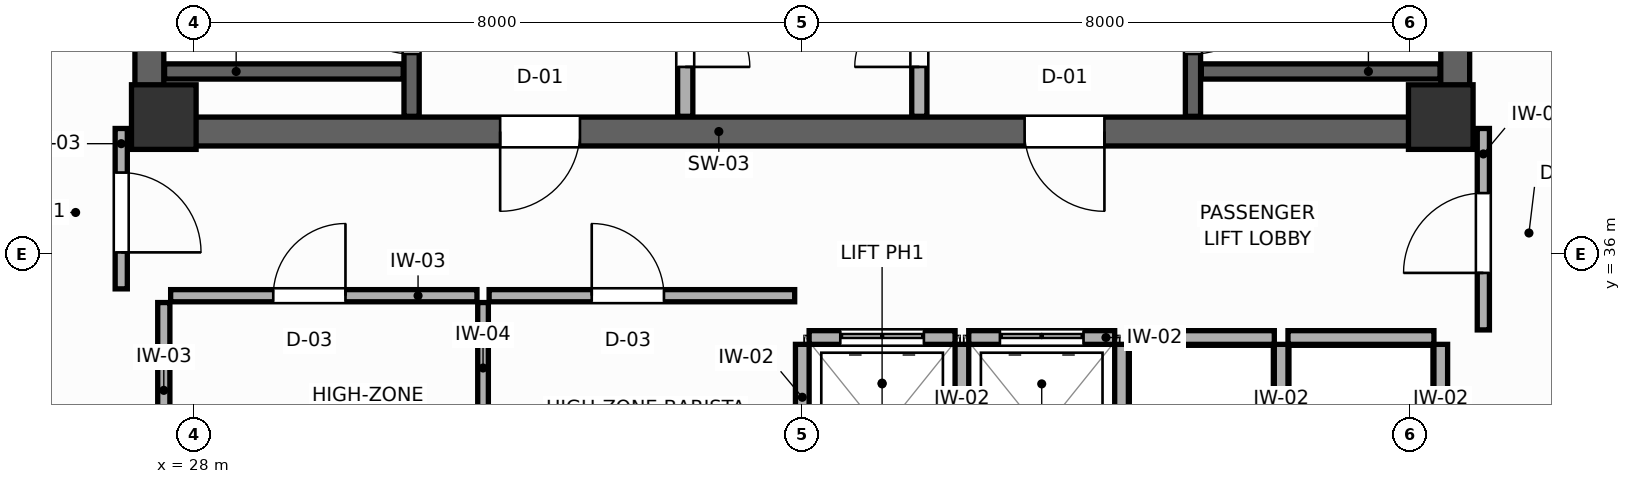
"""IFC4 building model, lengths in metres.
Left out: names, types, materials, properties, quantities, classifications, styles, units other than length and angle.
Written with IfcOpenShell. Run it as: python <this file> out.ifc"""

import sys

from ifc_helpers import new_model, si_unit, direction, frame, frame_2d, origin, origin_2d, place, context, subcontext, project, spatial, rectangle, extrude, source, transform, mapped, element, fill, save


model = new_model("IFC4")
c1 = context("Model", 3, precision=1e-05, world=origin(), true_north=direction((0.0, 1.0)))
c2 = subcontext(c1, "Body", "Model", "MODEL_VIEW")
j1 = project(units=[si_unit("LENGTHUNIT", "METRE"), si_unit("PLANEANGLEUNIT", "RADIAN")], contexts=[c1])
p1 = place(None, origin())
s1 = spatial("IfcSite", under=j1, at=p1, CompositionType="ELEMENT")
p2 = place(p1, origin())
s2 = spatial("IfcBuilding", under=s1, at=p2, CompositionType="ELEMENT")
p3 = place(p2, frame((0.0, 0.0, 250.2)))
s3 = spatial("IfcBuildingStorey", under=s2, at=p3, CompositionType="ELEMENT", Elevation=250.2)
p4 = place(p3, frame((27.22, 37.61, 0.0), z_axis=(0.0, 0.0, 1.0), x_axis=(1.0, 0.0, 0.0)))
e1 = element("IfcWall", 1, at=p4, inside=s3, PredefinedType="SHEAR", context=c2, shape_type="SweptSolid", body=[
    extrude(rectangle(XDim=17.56, YDim=0.38, at=frame_2d((8.78, 0.0))), origin(), (0.0, 0.0, 1.0), 3.6),
])
p5 = place(p4, frame((4.805, 0.0, 0.0)))
e2 = element("IfcOpeningElement", 2, at=p5, cuts=e1, PredefinedType="OPENING", context=c2, shape_type="SweptSolid", body=[
    extrude(rectangle(XDim=1.05, YDim=2.1, at=frame_2d((0.525, 1.05))), frame((0.0, 0.2, 0.0), z_axis=(0.0, -1.0, 0.0), x_axis=(1.0, 0.0, 0.0)), (0.0, 0.0, 1.0), 0.4),
])
p6 = place(p4, frame((11.705, 0.0, 0.0)))
e3 = element("IfcOpeningElement", 3, at=p6, cuts=e1, PredefinedType="OPENING", context=c2, shape_type="SweptSolid", body=[
    extrude(rectangle(XDim=1.05, YDim=2.1, at=frame_2d((0.525, 1.05))), frame((0.0, 0.2, 0.0), z_axis=(0.0, -1.0, 0.0), x_axis=(1.0, 0.0, 0.0)), (0.0, 0.0, 1.0), 0.4),
])
for number, where, z_axis, x_axis in (
    (4, (27.41, 37.8, 0.0), (0.0, 0.0, 1.0), (0.0, 1.0, 0.0)),
    (5, (44.59, 37.8, 0.0), (0.0, 0.0, 1.0), (0.0, 1.0, 0.0)),
):
    element("IfcWall", number, at=place(p3, frame(where, z_axis=z_axis, x_axis=x_axis)), inside=s3, PredefinedType="SHEAR", context=c2, shape_type="SweptSolid", body=[
        extrude(rectangle(XDim=9.0, YDim=0.38, at=frame_2d((4.5, 0.0))), origin(), (0.0, 0.0, 1.0), 3.6),
    ])
m1 = source(origin(), c2, "Body", "SweptSolid", [
    extrude(rectangle(XDim=0.85, YDim=0.85, at=origin_2d()), origin(), (0.0, 0.0, 1.0), 3.6),
])
for number, where, z_axis, x_axis in (
    (6, (27.6, 37.8, 0.0), (0.0, 0.0, 1.0), (1.0, 0.0, 0.0)),
    (7, (44.4, 37.8, 0.0), (0.0, 0.0, 1.0), (1.0, 0.0, 0.0)),
):
    element("IfcColumn", number, at=place(p3, frame(where, z_axis=z_axis, x_axis=x_axis)), inside=s3, PredefinedType="COLUMN", context=c2, shape_type="MappedRepresentation", body=[
        mapped(m1, transform((0.0, 0.0, 0.0), scale=1.0)),
    ])
p7 = place(p3, frame((30.86, 37.81, 0.0), z_axis=(0.0, 0.0, 1.0), x_axis=(0.0, 1.0, 0.0)))
e8 = element("IfcWall", 8, at=p7, inside=s3, PredefinedType="SHEAR", context=c2, shape_type="SweptSolid", body=[
    extrude(rectangle(XDim=8.98, YDim=0.2, at=frame_2d((4.49, 0.0))), origin(), (0.0, 0.0, 1.0), 3.6),
])
p8 = place(p7, frame((0.82, 0.0, 0.0)))
e9 = element("IfcOpeningElement", 9, at=p8, cuts=e8, PredefinedType="OPENING", context=c2, shape_type="SweptSolid", body=[
    extrude(rectangle(XDim=1.05, YDim=2.1, at=frame_2d((0.525, 1.05))), frame((0.0, 0.11, 0.0), z_axis=(0.0, -1.0, 0.0), x_axis=(1.0, 0.0, 0.0)), (0.0, 0.0, 1.0), 0.22),
])
p9 = place(p3, frame((27.61, 38.4, 0.0), z_axis=(0.0, 0.0, 1.0), x_axis=(1.0, 0.0, 0.0)))
e10 = element("IfcWall", 10, at=p9, inside=s3, PredefinedType="SHEAR", context=c2, shape_type="SweptSolid", body=[
    extrude(rectangle(XDim=3.14, YDim=0.2, at=frame_2d((1.57, 0.0))), origin(), (0.0, 0.0, 1.0), 3.6),
])
p10 = place(p3, frame((41.14, 37.81, 0.0), z_axis=(0.0, 0.0, 1.0), x_axis=(0.0, 1.0, 0.0)))
e11 = element("IfcWall", 11, at=p10, inside=s3, PredefinedType="SHEAR", context=c2, shape_type="SweptSolid", body=[
    extrude(rectangle(XDim=8.98, YDim=0.2, at=frame_2d((4.49, 0.0))), origin(), (0.0, 0.0, 1.0), 3.6),
])
p11 = place(p10, frame((0.82, 0.0, 0.0)))
e12 = element("IfcOpeningElement", 12, at=p11, cuts=e11, PredefinedType="OPENING", context=c2, shape_type="SweptSolid", body=[
    extrude(rectangle(XDim=1.05, YDim=2.1, at=frame_2d((0.525, 1.05))), frame((0.0, 0.11, 0.0), z_axis=(0.0, -1.0, 0.0), x_axis=(1.0, 0.0, 0.0)), (0.0, 0.0, 1.0), 0.22),
])
p12 = place(p3, frame((41.25, 38.4, 0.0), z_axis=(0.0, 0.0, 1.0), x_axis=(1.0, 0.0, 0.0)))
e13 = element("IfcWall", 13, at=p12, inside=s3, PredefinedType="SHEAR", context=c2, shape_type="SweptSolid", body=[
    extrude(rectangle(XDim=3.14, YDim=0.2, at=frame_2d((1.57, 0.0))), origin(), (0.0, 0.0, 1.0), 3.6),
])
p13 = place(p3, frame((34.46, 37.81, 0.0), z_axis=(0.0, 0.0, 1.0), x_axis=(0.0, 1.0, 0.0)))
e14 = element("IfcWall", 14, at=p13, inside=s3, PredefinedType="PARTITIONING", context=c2, shape_type="SweptSolid", body=[
    extrude(rectangle(XDim=8.98, YDim=0.2, at=frame_2d((4.49, 0.0))), origin(), (0.0, 0.0, 1.0), 3.41),
])
p14 = place(p13, frame((0.65, 0.0, 0.0)))
e15 = element("IfcOpeningElement", 15, at=p14, cuts=e14, PredefinedType="OPENING", context=c2, shape_type="SweptSolid", body=[
    extrude(rectangle(XDim=0.85, YDim=2.05, at=frame_2d((0.425, 1.025))), frame((0.0, 0.11, 0.0), z_axis=(0.0, -1.0, 0.0), x_axis=(1.0, 0.0, 0.0)), (0.0, 0.0, 1.0), 0.22),
])
p15 = place(p3, frame((37.54, 37.81, 0.0), z_axis=(0.0, 0.0, 1.0), x_axis=(0.0, 1.0, 0.0)))
e16 = element("IfcWall", 16, at=p15, inside=s3, PredefinedType="PARTITIONING", context=c2, shape_type="SweptSolid", body=[
    extrude(rectangle(XDim=8.98, YDim=0.2, at=frame_2d((4.49, 0.0))), origin(), (0.0, 0.0, 1.0), 3.41),
])
p16 = place(p15, frame((0.65, 0.0, 0.0)))
e17 = element("IfcOpeningElement", 17, at=p16, cuts=e16, PredefinedType="OPENING", context=c2, shape_type="SweptSolid", body=[
    extrude(rectangle(XDim=0.85, YDim=2.05, at=frame_2d((0.425, 1.025))), frame((0.0, 0.11, 0.0), z_axis=(0.0, -1.0, 0.0), x_axis=(1.0, 0.0, 0.0)), (0.0, 0.0, 1.0), 0.22),
])
p17 = place(p3, frame((36.09, 34.9, 0.0), z_axis=(0.0, 0.0, 1.0), x_axis=(1.0, 0.0, 0.0)))
e18 = element("IfcWall", 18, at=p17, inside=s3, PredefinedType="PARTITIONING", context=c2, shape_type="SweptSolid", body=[
    extrude(rectangle(XDim=1.92, YDim=0.18, at=frame_2d((0.96, 0.0))), origin(), (0.0, 0.0, 1.0), 3.41),
])
p18 = place(p17, frame((0.41, 0.0, 0.0)))
e19 = element("IfcOpeningElement", 19, at=p18, cuts=e18, PredefinedType="OPENING", context=c2, shape_type="SweptSolid", body=[
    extrude(rectangle(XDim=1.1, YDim=2.1, at=frame_2d((0.55, 1.05))), frame((0.0, 0.1, 0.0), z_axis=(0.0, -1.0, 0.0), x_axis=(1.0, 0.0, 0.0)), (0.0, 0.0, 1.0), 0.2),
])
p19 = place(p3, frame((36.0, 32.49, 0.0), z_axis=(0.0, 0.0, 1.0), x_axis=(0.0, 1.0, 0.0)))
e20 = element("IfcWall", 20, at=p19, inside=s3, PredefinedType="PARTITIONING", context=c2, shape_type="SweptSolid", body=[
    extrude(rectangle(XDim=2.32, YDim=0.18, at=frame_2d((1.16, 0.0))), origin(), (0.0, 0.0, 1.0), 3.41),
])
p20 = place(p3, frame((38.19, 34.9, 0.0), z_axis=(0.0, 0.0, 1.0), x_axis=(1.0, 0.0, 0.0)))
e21 = element("IfcWall", 21, at=p20, inside=s3, PredefinedType="PARTITIONING", context=c2, shape_type="SweptSolid", body=[
    extrude(rectangle(XDim=1.92, YDim=0.18, at=frame_2d((0.96, 0.0))), origin(), (0.0, 0.0, 1.0), 3.41),
])
p21 = place(p20, frame((0.41, 0.0, 0.0)))
e22 = element("IfcOpeningElement", 22, at=p21, cuts=e21, PredefinedType="OPENING", context=c2, shape_type="SweptSolid", body=[
    extrude(rectangle(XDim=1.1, YDim=2.1, at=frame_2d((0.55, 1.05))), frame((0.0, 0.1, 0.0), z_axis=(0.0, -1.0, 0.0), x_axis=(1.0, 0.0, 0.0)), (0.0, 0.0, 1.0), 0.2),
])
p22 = place(p3, frame((38.1, 32.49, 0.0), z_axis=(0.0, 0.0, 1.0), x_axis=(0.0, 1.0, 0.0)))
e23 = element("IfcWall", 23, at=p22, inside=s3, PredefinedType="PARTITIONING", context=c2, shape_type="SweptSolid", body=[
    extrude(rectangle(XDim=2.32, YDim=0.18, at=frame_2d((1.16, 0.0))), origin(), (0.0, 0.0, 1.0), 3.41),
])
p23 = place(p3, frame((40.29, 34.9, 0.0), z_axis=(0.0, 0.0, 1.0), x_axis=(1.0, 0.0, 0.0)))
e24 = element("IfcWall", 24, at=p23, inside=s3, PredefinedType="PARTITIONING", context=c2, shape_type="SweptSolid", body=[
    extrude(rectangle(XDim=1.92, YDim=0.18, at=frame_2d((0.96, 0.0))), origin(), (0.0, 0.0, 1.0), 3.41),
])
p24 = place(p3, frame((40.2, 32.49, 0.0), z_axis=(0.0, 0.0, 1.0), x_axis=(0.0, 1.0, 0.0)))
e25 = element("IfcWall", 25, at=p24, inside=s3, PredefinedType="PARTITIONING", context=c2, shape_type="SweptSolid", body=[
    extrude(rectangle(XDim=2.32, YDim=0.18, at=frame_2d((1.16, 0.0))), origin(), (0.0, 0.0, 1.0), 3.41),
])
p25 = place(p3, frame((42.39, 34.9, 0.0), z_axis=(0.0, 0.0, 1.0), x_axis=(1.0, 0.0, 0.0)))
e26 = element("IfcWall", 26, at=p25, inside=s3, PredefinedType="PARTITIONING", context=c2, shape_type="SweptSolid", body=[
    extrude(rectangle(XDim=1.92, YDim=0.18, at=frame_2d((0.96, 0.0))), origin(), (0.0, 0.0, 1.0), 3.41),
])
for number, where, z_axis, x_axis in (
    (27, (42.3, 32.49, 0.0), (0.0, 0.0, 1.0), (0.0, 1.0, 0.0)),
    (28, (44.4, 32.49, 0.0), (0.0, 0.0, 1.0), (0.0, 1.0, 0.0)),
):
    element("IfcWall", number, at=place(p3, frame(where, z_axis=z_axis, x_axis=x_axis)), inside=s3, PredefinedType="PARTITIONING", context=c2, shape_type="SweptSolid", body=[
        extrude(rectangle(XDim=2.32, YDim=0.18, at=frame_2d((1.16, 0.0))), origin(), (0.0, 0.0, 1.0), 3.41),
    ])
p26 = place(p3, frame((27.6, 33.05, 0.0), z_axis=(0.0, 0.0, 1.0), x_axis=(0.0, 1.0, 0.0)))
e29 = element("IfcWall", 29, at=p26, inside=s3, PredefinedType="PARTITIONING", context=c2, shape_type="SweptSolid", body=[
    extrude(rectangle(XDim=2.31, YDim=0.16, at=frame_2d((1.155, 0.0))), origin(), (0.0, 0.0, 1.0), 3.41),
])
p27 = place(p3, frame((31.8, 32.49, 0.0), z_axis=(0.0, 0.0, 1.0), x_axis=(0.0, 1.0, 0.0)))
e30 = element("IfcWall", 30, at=p27, inside=s3, PredefinedType="PARTITIONING", context=c2, shape_type="SweptSolid", body=[
    extrude(rectangle(XDim=2.87, YDim=0.14, at=frame_2d((1.435, 0.0))), origin(), (0.0, 0.0, 1.0), 3.41),
])
p28 = place(p3, frame((27.69, 35.45, 0.0), z_axis=(0.0, 0.0, 1.0), x_axis=(1.0, 0.0, 0.0)))
e31 = element("IfcWall", 31, at=p28, inside=s3, PredefinedType="PARTITIONING", context=c2, shape_type="SweptSolid", body=[
    extrude(rectangle(XDim=4.03, YDim=0.16, at=frame_2d((2.015, 0.0))), origin(), (0.0, 0.0, 1.0), 3.41),
])
p29 = place(p28, frame((1.35, 0.0, 0.0)))
e32 = element("IfcOpeningElement", 32, at=p29, cuts=e31, PredefinedType="OPENING", context=c2, shape_type="SweptSolid", body=[
    extrude(rectangle(XDim=0.95, YDim=2.05, at=frame_2d((0.475, 1.025))), frame((0.0, 0.09, 0.0), z_axis=(0.0, -1.0, 0.0), x_axis=(1.0, 0.0, 0.0)), (0.0, 0.0, 1.0), 0.18),
])
p30 = place(p3, frame((31.88, 35.45, 0.0), z_axis=(0.0, 0.0, 1.0), x_axis=(1.0, 0.0, 0.0)))
e33 = element("IfcWall", 33, at=p30, inside=s3, PredefinedType="PARTITIONING", context=c2, shape_type="SweptSolid", body=[
    extrude(rectangle(XDim=4.02, YDim=0.16, at=frame_2d((2.01, 0.0))), origin(), (0.0, 0.0, 1.0), 3.41),
])
p31 = place(p30, frame((1.35, 0.0, 0.0)))
e34 = element("IfcOpeningElement", 34, at=p31, cuts=e33, PredefinedType="OPENING", context=c2, shape_type="SweptSolid", body=[
    extrude(rectangle(XDim=0.95, YDim=2.05, at=frame_2d((0.475, 1.025))), frame((0.0, 0.09, 0.0), z_axis=(0.0, -1.0, 0.0), x_axis=(1.0, 0.0, 0.0)), (0.0, 0.0, 1.0), 0.18),
])
p32 = place(p3, frame((27.04, 35.54, 0.0), z_axis=(0.0, 0.0, 1.0), x_axis=(0.0, 1.0, 0.0)))
e35 = element("IfcWall", 35, at=p32, inside=s3, PredefinedType="PARTITIONING", context=c2, shape_type="SweptSolid", body=[
    extrude(rectangle(XDim=2.11, YDim=0.16, at=frame_2d((1.055, 0.0))), origin(), (0.0, 0.0, 1.0), 3.41),
])
p33 = place(p32, frame((0.48, 0.0, 0.0)))
e36 = element("IfcOpeningElement", 36, at=p33, cuts=e35, PredefinedType="OPENING", context=c2, shape_type="SweptSolid", body=[
    extrude(rectangle(XDim=1.05, YDim=2.1, at=frame_2d((0.525, 1.05))), frame((0.0, 0.09, 0.0), z_axis=(0.0, -1.0, 0.0), x_axis=(1.0, 0.0, 0.0)), (0.0, 0.0, 1.0), 0.18),
])
p34 = place(p3, frame((44.96, 35.0, 0.0), z_axis=(0.0, 0.0, 1.0), x_axis=(0.0, 1.0, 0.0)))
e37 = element("IfcWall", 37, at=p34, inside=s3, PredefinedType="PARTITIONING", context=c2, shape_type="SweptSolid", body=[
    extrude(rectangle(XDim=2.65, YDim=0.16, at=frame_2d((1.325, 0.0))), origin(), (0.0, 0.0, 1.0), 3.41),
])
p35 = place(p34, frame((0.75, 0.0, 0.0)))
e38 = element("IfcOpeningElement", 38, at=p35, cuts=e37, PredefinedType="OPENING", context=c2, shape_type="SweptSolid", body=[
    extrude(rectangle(XDim=1.05, YDim=2.1, at=frame_2d((0.525, 1.05))), frame((0.0, 0.09, 0.0), z_axis=(0.0, -1.0, 0.0), x_axis=(1.0, 0.0, 0.0)), (0.0, 0.0, 1.0), 0.18),
])
p36 = place(p8, origin())
e39 = element("IfcDoor", 39, at=p36, inside=s3, OperationType="SINGLE_SWING_RIGHT", PredefinedType="DOOR", context=c2, shape_type="SweptSolid", body=[
    extrude(rectangle(XDim=1.05, YDim=2.1, at=frame_2d((0.525, 1.05))), frame((0.0, 0.025, 0.0), z_axis=(0.0, -1.0, 0.0), x_axis=(1.0, 0.0, 0.0)), (0.0, 0.0, 1.0), 0.05),
])
fill(e9, e39)
p37 = place(p11, frame((1.05, 0.0, 0.0), z_axis=(0.0, 0.0, 1.0), x_axis=(-1.0, 0.0, 0.0)))
e40 = element("IfcDoor", 40, at=p37, inside=s3, OperationType="SINGLE_SWING_LEFT", PredefinedType="DOOR", context=c2, shape_type="SweptSolid", body=[
    extrude(rectangle(XDim=1.05, YDim=2.1, at=frame_2d((0.525, 1.05))), frame((0.0, 0.025, 0.0), z_axis=(0.0, -1.0, 0.0), x_axis=(1.0, 0.0, 0.0)), (0.0, 0.0, 1.0), 0.05),
])
fill(e12, e40)
p38 = place(p14, frame((0.85, 0.0, 0.0), z_axis=(0.0, 0.0, 1.0), x_axis=(-1.0, 0.0, 0.0)))
e41 = element("IfcDoor", 41, at=p38, inside=s3, OperationType="SINGLE_SWING_RIGHT", PredefinedType="DOOR", context=c2, shape_type="SweptSolid", body=[
    extrude(rectangle(XDim=0.85, YDim=2.05, at=frame_2d((0.425, 1.025))), frame((0.0, 0.025, 0.0), z_axis=(0.0, -1.0, 0.0), x_axis=(1.0, 0.0, 0.0)), (0.0, 0.0, 1.0), 0.05),
])
fill(e15, e41)
p39 = place(p16, origin())
e42 = element("IfcDoor", 42, at=p39, inside=s3, OperationType="SINGLE_SWING_LEFT", PredefinedType="DOOR", context=c2, shape_type="SweptSolid", body=[
    extrude(rectangle(XDim=0.85, YDim=2.05, at=frame_2d((0.425, 1.025))), frame((0.0, 0.025, 0.0), z_axis=(0.0, -1.0, 0.0), x_axis=(1.0, 0.0, 0.0)), (0.0, 0.0, 1.0), 0.05),
])
fill(e17, e42)
p40 = place(p18, origin())
e43 = element("IfcDoor", 43, at=p40, inside=s3, OperationType="DOUBLE_DOOR_SLIDING", PredefinedType="DOOR", context=c2, shape_type="SweptSolid", body=[
    extrude(rectangle(XDim=1.1, YDim=2.1, at=frame_2d((0.55, 1.05))), frame((0.0, 0.025, 0.0), z_axis=(0.0, -1.0, 0.0), x_axis=(1.0, 0.0, 0.0)), (0.0, 0.0, 1.0), 0.05),
])
fill(e19, e43)
p41 = place(p21, origin())
e44 = element("IfcDoor", 44, at=p41, inside=s3, OperationType="DOUBLE_DOOR_SLIDING", PredefinedType="DOOR", context=c2, shape_type="SweptSolid", body=[
    extrude(rectangle(XDim=1.1, YDim=2.1, at=frame_2d((0.55, 1.05))), frame((0.0, 0.025, 0.0), z_axis=(0.0, -1.0, 0.0), x_axis=(1.0, 0.0, 0.0)), (0.0, 0.0, 1.0), 0.05),
])
fill(e22, e44)
p42 = place(p29, origin())
e45 = element("IfcDoor", 45, at=p42, inside=s3, OperationType="SINGLE_SWING_RIGHT", PredefinedType="DOOR", context=c2, shape_type="SweptSolid", body=[
    extrude(rectangle(XDim=0.95, YDim=2.05, at=frame_2d((0.475, 1.025))), frame((0.0, 0.025, 0.0), z_axis=(0.0, -1.0, 0.0), x_axis=(1.0, 0.0, 0.0)), (0.0, 0.0, 1.0), 0.05),
])
fill(e32, e45)
p43 = place(p31, origin())
e46 = element("IfcDoor", 46, at=p43, inside=s3, OperationType="SINGLE_SWING_LEFT", PredefinedType="DOOR", context=c2, shape_type="SweptSolid", body=[
    extrude(rectangle(XDim=0.95, YDim=2.05, at=frame_2d((0.475, 1.025))), frame((0.0, 0.025, 0.0), z_axis=(0.0, -1.0, 0.0), x_axis=(1.0, 0.0, 0.0)), (0.0, 0.0, 1.0), 0.05),
])
fill(e34, e46)
p44 = place(p33, frame((1.05, 0.0, 0.0), z_axis=(0.0, 0.0, 1.0), x_axis=(-1.0, 0.0, 0.0)))
e47 = element("IfcDoor", 47, at=p44, inside=s3, OperationType="SINGLE_SWING_RIGHT", PredefinedType="DOOR", context=c2, shape_type="SweptSolid", body=[
    extrude(rectangle(XDim=1.05, YDim=2.1, at=frame_2d((0.525, 1.05))), frame((0.0, 0.025, 0.0), z_axis=(0.0, -1.0, 0.0), x_axis=(1.0, 0.0, 0.0)), (0.0, 0.0, 1.0), 0.05),
])
fill(e36, e47)
p45 = place(p35, origin())
e48 = element("IfcDoor", 48, at=p45, inside=s3, OperationType="SINGLE_SWING_LEFT", PredefinedType="DOOR", context=c2, shape_type="SweptSolid", body=[
    extrude(rectangle(XDim=1.05, YDim=2.1, at=frame_2d((0.525, 1.05))), frame((0.0, 0.025, 0.0), z_axis=(0.0, -1.0, 0.0), x_axis=(1.0, 0.0, 0.0)), (0.0, 0.0, 1.0), 0.05),
])
fill(e38, e48)
p46 = place(p5, frame((1.05, 0.0, 0.0), z_axis=(0.0, 0.0, 1.0), x_axis=(-1.0, 0.0, 0.0)))
e49 = element("IfcDoor", 49, at=p46, inside=s3, OperationType="SINGLE_SWING_RIGHT", PredefinedType="DOOR", context=c2, shape_type="SweptSolid", body=[
    extrude(rectangle(XDim=1.05, YDim=2.1, at=frame_2d((0.525, 1.05))), frame((0.0, 0.025, 0.0), z_axis=(0.0, -1.0, 0.0), x_axis=(1.0, 0.0, 0.0)), (0.0, 0.0, 1.0), 0.05),
])
fill(e2, e49)
p47 = place(p6, frame((1.05, 0.0, 0.0), z_axis=(0.0, 0.0, 1.0), x_axis=(-1.0, 0.0, 0.0)))
e50 = element("IfcDoor", 50, at=p47, inside=s3, OperationType="SINGLE_SWING_LEFT", PredefinedType="DOOR", context=c2, shape_type="SweptSolid", body=[
    extrude(rectangle(XDim=1.05, YDim=2.1, at=frame_2d((0.525, 1.05))), frame((0.0, 0.025, 0.0), z_axis=(0.0, -1.0, 0.0), x_axis=(1.0, 0.0, 0.0)), (0.0, 0.0, 1.0), 0.05),
])
fill(e3, e50)
save(model, sys.argv[1])
